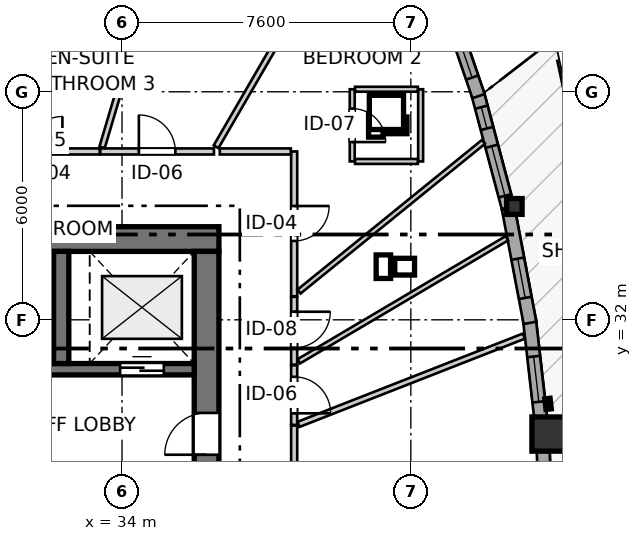
"""IFC4 building model, lengths in metres.
Left out: names, types, materials, properties, quantities, classifications, styles, units other than length and angle.
Written with IfcOpenShell. Run it as: python <this file> out.ifc"""

import sys

from ifc_helpers import new_model, si_unit, direction, frame, frame_2d, origin, origin_2d, place, context, subcontext, project, spatial, rectangle, i_section, extrude, source, transform, mapped, element, fill, save


model = new_model("IFC4")
c1 = context("Model", 3, precision=1e-05, world=origin(), true_north=direction((0.0, 1.0)))
c2 = subcontext(c1, "Body", "Model", "MODEL_VIEW")
j1 = project(units=[si_unit("LENGTHUNIT", "METRE"), si_unit("PLANEANGLEUNIT", "RADIAN")], contexts=[c1])
p1 = place(None, origin())
s1 = spatial("IfcSite", under=j1, at=p1, CompositionType="ELEMENT")
p2 = place(p1, origin())
s2 = spatial("IfcBuilding", under=s1, at=p2, CompositionType="ELEMENT")
p3 = place(p2, frame((0.0, 0.0, 89.6)))
s3 = spatial("IfcBuildingStorey", under=s2, at=p3, CompositionType="ELEMENT", Elevation=89.6)
p4 = place(p3, frame((36.55, 34.125, 0.0), z_axis=(0.0, 0.0, 1.0), x_axis=(-1.0, 0.0, 0.0)))
e1 = element("IfcWall", 1, at=p4, inside=s3, PredefinedType="SHEAR", context=c2, shape_type="SweptSolid", body=[
    extrude(rectangle(XDim=12.4, YDim=0.65, at=frame_2d((6.2, 0.0))), origin(), (0.0, 0.0, 1.0), 2.95),
])
p5 = place(p3, frame((36.225, 18.2, 0.0), z_axis=(0.0, 0.0, 1.0), x_axis=(0.0, 1.0, 0.0)))
e2 = element("IfcWall", 2, at=p5, inside=s3, PredefinedType="SHEAR", context=c2, shape_type="SweptSolid", body=[
    extrude(rectangle(XDim=15.6, YDim=0.65, at=frame_2d((7.8, 0.0))), origin(), (0.0, 0.0, 1.0), 2.95),
])
p6 = place(p5, frame((4.25, 0.0, 0.0)))
e3 = element("IfcOpeningElement", 3, at=p6, cuts=e2, PredefinedType="OPENING", context=c2, shape_type="SweptSolid", body=[
    extrude(rectangle(XDim=1.1, YDim=2.15, at=frame_2d((0.55, 1.075))), frame((0.0, 0.335, 0.0), z_axis=(0.0, -1.0, 0.0), x_axis=(1.0, 0.0, 0.0)), (0.0, 0.0, 1.0), 0.67),
])
p7 = place(p5, frame((10.25, 0.0, 0.0)))
e4 = element("IfcOpeningElement", 4, at=p7, cuts=e2, PredefinedType="OPENING", context=c2, shape_type="SweptSolid", body=[
    extrude(rectangle(XDim=1.1, YDim=2.15, at=frame_2d((0.55, 1.075))), frame((0.0, 0.335, 0.0), z_axis=(0.0, -1.0, 0.0), x_axis=(1.0, 0.0, 0.0)), (0.0, 0.0, 1.0), 0.67),
])
p8 = place(p3, frame((24.8, 30.7, 0.0), z_axis=(0.0, 0.0, 1.0), x_axis=(1.0, 0.0, 0.0)))
e5 = element("IfcWall", 5, at=p8, inside=s3, PredefinedType="SHEAR", context=c2, shape_type="SweptSolid", body=[
    extrude(rectangle(XDim=11.1, YDim=0.3, at=frame_2d((5.55, 0.0))), origin(), (0.0, 0.0, 1.0), 2.95),
])
p9 = place(p8, frame((6.22, 0.0, 0.0)))
e6 = element("IfcOpeningElement", 6, at=p9, cuts=e5, PredefinedType="OPENING", context=c2, shape_type="SweptSolid", body=[
    extrude(rectangle(XDim=0.98, YDim=2.15, at=frame_2d((0.49, 1.075))), frame((0.0, 0.16, 0.0), z_axis=(0.0, -1.0, 0.0), x_axis=(1.0, 0.0, 0.0)), (0.0, 0.0, 1.0), 0.32),
])
p10 = place(p8, frame((9.15, 0.0, 0.0)))
e7 = element("IfcOpeningElement", 7, at=p10, cuts=e5, PredefinedType="OPENING", context=c2, shape_type="SweptSolid", body=[
    extrude(rectangle(XDim=1.15, YDim=2.15, at=frame_2d((0.575, 1.075))), frame((0.0, 0.16, 0.0), z_axis=(0.0, -1.0, 0.0), x_axis=(1.0, 0.0, 0.0)), (0.0, 0.0, 1.0), 0.32),
])
p11 = place(p3, frame((32.4, 30.85, 0.0), z_axis=(0.0, 0.0, 1.0), x_axis=(0.0, 1.0, 0.0)))
e8 = element("IfcWall", 8, at=p11, inside=s3, PredefinedType="SHEAR", context=c2, shape_type="SweptSolid", body=[
    extrude(rectangle(XDim=2.95, YDim=0.4, at=frame_2d((1.475, 0.0))), origin(), (0.0, 0.0, 1.0), 2.95),
])
m1 = source(origin(), c2, "Body", "SweptSolid", [
    extrude(rectangle(XDim=0.9, YDim=0.9, at=origin_2d()), origin(), (0.0, 0.0, 1.0), 2.95),
])
p12 = place(p3, frame((45.236, 28.994, 0.0), z_axis=(0.0, 0.0, 1.0), x_axis=(1.0, 0.0, 0.0)))
e9 = element("IfcColumn", 9, at=p12, inside=s3, PredefinedType="COLUMN", context=c2, shape_type="MappedRepresentation", body=[
    mapped(m1, transform((0.0, 0.0, 0.0), x_axis=(1.0, 0.0, 0.0), y_axis=(0.0, 1.0, 0.0), z_axis=(0.0, 0.0, 1.0), scale=1.0)),
])
m2 = source(origin(), c2, "Body", "SweptSolid", [
    extrude(i_section(OverallWidth=0.406, OverallDepth=0.416, WebThickness=0.027, FlangeThickness=0.044, FilletRadius=0.015, at=origin_2d()), origin(), (0.0, 0.0, 1.0), 2.95),
])
p13 = place(p3, frame((44.325, 34.983, 0.0), z_axis=(0.0, 0.0, 1.0), x_axis=(1.0, 0.0, 0.0)))
e10 = element("IfcColumn", 10, at=p13, inside=s3, PredefinedType="PILASTER", context=c2, shape_type="MappedRepresentation", body=[
    mapped(m2, transform((0.0, 0.0, 0.0), x_axis=(1.0, 0.0, 0.0), y_axis=(0.0, 1.0, 0.0), z_axis=(0.0, 0.0, 1.0), scale=1.0)),
])
p14 = place(p3, frame((45.181, 25.956, 0.0), z_axis=(0.0, 0.0, 1.0), x_axis=(-0.037958336355, 0.999279322663, 0.0)))
e11 = element("IfcWall", 11, at=p14, inside=s3, PredefinedType="SOLIDWALL", context=c2, shape_type="SweptSolid", body=[
    extrude(rectangle(XDim=2.804, YDim=0.34, at=frame_2d((1.402, 0.0))), origin(), (0.0, 0.0, 1.0), 2.48),
])
p15 = place(p14, frame((0.732, 0.0, 0.82)))
e12 = element("IfcOpeningElement", 12, at=p15, cuts=e11, PredefinedType="OPENING", context=c2, shape_type="SweptSolid", body=[
    extrude(rectangle(XDim=1.35, YDim=1.45, at=frame_2d((0.675, 0.725))), frame((0.0, 0.18, 0.0), z_axis=(0.0, -1.0, 0.0), x_axis=(1.0, 0.0, 0.0)), (0.0, 0.0, 1.0), 0.36),
])
p16 = place(p3, frame((45.041, 29.204, 0.0), z_axis=(0.0, 0.0, 1.0), x_axis=(-0.113261075266, 0.993565261485, 0.0)))
e13 = element("IfcWall", 13, at=p16, inside=s3, PredefinedType="SOLIDWALL", context=c2, shape_type="SweptSolid", body=[
    extrude(rectangle(XDim=2.822, YDim=0.34, at=frame_2d((1.411, 0.0))), origin(), (0.0, 0.0, 1.0), 2.48),
])
p17 = place(p16, frame((0.642, 0.0, 0.82)))
e14 = element("IfcOpeningElement", 14, at=p17, cuts=e13, PredefinedType="OPENING", context=c2, shape_type="SweptSolid", body=[
    extrude(rectangle(XDim=1.2, YDim=1.45, at=frame_2d((0.6, 0.725))), frame((0.0, 0.18, 0.0), z_axis=(0.0, -1.0, 0.0), x_axis=(1.0, 0.0, 0.0)), (0.0, 0.0, 1.0), 0.36),
])
p18 = place(p3, frame((44.735, 31.919, 0.0), z_axis=(0.0, 0.0, 1.0), x_axis=(-0.186735196273, 0.982410284185, 0.0)))
e15 = element("IfcWall", 15, at=p18, inside=s3, PredefinedType="SOLIDWALL", context=c2, shape_type="SweptSolid", body=[
    extrude(rectangle(XDim=3.066, YDim=0.34, at=frame_2d((1.533, 0.0))), origin(), (0.0, 0.0, 1.0), 2.48),
])
p19 = place(p18, frame((0.669, 0.0, 0.82)))
e16 = element("IfcOpeningElement", 16, at=p19, cuts=e15, PredefinedType="OPENING", context=c2, shape_type="SweptSolid", body=[
    extrude(rectangle(XDim=1.05, YDim=1.45, at=frame_2d((0.525, 0.725))), frame((0.0, 0.18, 0.0), z_axis=(0.0, -1.0, 0.0), x_axis=(1.0, 0.0, 0.0)), (0.0, 0.0, 1.0), 0.36),
])
p20 = place(p3, frame((44.156, 34.958, 0.0), z_axis=(0.0, 0.0, 1.0), x_axis=(-0.257033600382, 0.966402467026, 0.0)))
e17 = element("IfcWall", 17, at=p20, inside=s3, PredefinedType="SOLIDWALL", context=c2, shape_type="SweptSolid", body=[
    extrude(rectangle(XDim=3.116, YDim=0.34, at=frame_2d((1.558, 0.0))), origin(), (0.0, 0.0, 1.0), 2.48),
])
p21 = place(p20, frame((0.315, 0.0, 0.82)))
e18 = element("IfcOpeningElement", 18, at=p21, cuts=e17, PredefinedType="OPENING", context=c2, shape_type="SweptSolid", body=[
    extrude(rectangle(XDim=1.35, YDim=1.45, at=frame_2d((0.675, 0.725))), frame((0.0, 0.18, 0.0), z_axis=(0.0, -1.0, 0.0), x_axis=(1.0, 0.0, 0.0)), (0.0, 0.0, 1.0), 0.36),
])
p22 = place(p20, frame((2.148, 0.0, 0.82)))
e19 = element("IfcOpeningElement", 19, at=p22, cuts=e17, PredefinedType="OPENING", context=c2, shape_type="SweptSolid", body=[
    extrude(rectangle(XDim=0.58, YDim=1.35, at=frame_2d((0.29, 0.675))), frame((0.0, 0.18, 0.0), z_axis=(0.0, -1.0, 0.0), x_axis=(1.0, 0.0, 0.0)), (0.0, 0.0, 1.0), 0.36),
])
p23 = place(p3, frame((43.38, 37.886, 0.0), z_axis=(0.0, 0.0, 1.0), x_axis=(-0.323536742898, 0.946215607562, 0.0)))
e20 = element("IfcWall", 20, at=p23, inside=s3, PredefinedType="SOLIDWALL", context=c2, shape_type="SweptSolid", body=[
    extrude(rectangle(XDim=2.972, YDim=0.34, at=frame_2d((1.486, 0.0))), origin(), (0.0, 0.0, 1.0), 2.48),
])
p24 = place(p23, frame((0.516, 0.0, 0.82)))
e21 = element("IfcOpeningElement", 21, at=p24, cuts=e20, PredefinedType="OPENING", context=c2, shape_type="SweptSolid", body=[
    extrude(rectangle(XDim=1.95, YDim=1.4, at=frame_2d((0.975, 0.7))), frame((0.0, 0.18, 0.0), z_axis=(0.0, -1.0, 0.0), x_axis=(1.0, 0.0, 0.0)), (0.0, 0.0, 1.0), 0.36),
])
p25 = place(p3, frame((38.53, 29.22, 0.0), z_axis=(0.0, 0.0, 1.0), x_axis=(0.0, -1.0, 0.0)))
e22 = element("IfcWall", 22, at=p25, inside=s3, PredefinedType="PARTITIONING", context=c2, shape_type="SweptSolid", body=[
    extrude(rectangle(XDim=4.467, YDim=0.16, at=frame_2d((2.233, 0.0))), origin(), (0.0, 0.0, 1.0), 2.95),
])
p26 = place(p25, frame((1.584, 0.0, 0.0)))
e23 = element("IfcOpeningElement", 23, at=p26, cuts=e22, PredefinedType="OPENING", context=c2, shape_type="SweptSolid", body=[
    extrude(rectangle(XDim=1.3, YDim=2.1, at=frame_2d((0.65, 1.05))), frame((0.0, 0.09, 0.0), z_axis=(0.0, -1.0, 0.0), x_axis=(1.0, 0.0, 0.0)), (0.0, 0.0, 1.0), 0.18),
])
p27 = place(p3, frame((38.53, 36.43, 0.0), z_axis=(0.0, 0.0, 1.0), x_axis=(0.0, -1.0, 0.0)))
e24 = element("IfcWall", 24, at=p27, inside=s3, PredefinedType="PARTITIONING", context=c2, shape_type="SweptSolid", body=[
    extrude(rectangle(XDim=3.81, YDim=0.16, at=frame_2d((1.905, 0.0))), origin(), (0.0, 0.0, 1.0), 2.588),
])
p28 = place(p27, frame((1.436, 0.0, 0.0)))
e25 = element("IfcOpeningElement", 25, at=p28, cuts=e24, PredefinedType="OPENING", context=c2, shape_type="SweptSolid", body=[
    extrude(rectangle(XDim=0.92, YDim=2.1, at=frame_2d((0.46, 1.05))), frame((0.0, 0.09, 0.0), z_axis=(0.0, -1.0, 0.0), x_axis=(1.0, 0.0, 0.0)), (0.0, 0.0, 1.0), 0.18),
])
p29 = place(p3, frame((33.428, 36.43, 0.0), z_axis=(0.0, 0.0, 1.0), x_axis=(1.0, 0.0, 0.0)))
e26 = element("IfcWall", 26, at=p29, inside=s3, PredefinedType="PARTITIONING", context=c2, shape_type="SweptSolid", body=[
    extrude(rectangle(XDim=2.992, YDim=0.16, at=frame_2d((1.496, 0.0))), origin(), (0.0, 0.0, 1.0), 2.95),
])
p30 = place(p29, frame((1.015, 0.0, 0.0)))
e27 = element("IfcOpeningElement", 27, at=p30, cuts=e26, PredefinedType="OPENING", context=c2, shape_type="SweptSolid", body=[
    extrude(rectangle(XDim=0.96, YDim=2.1, at=frame_2d((0.48, 1.05))), frame((0.0, 0.09, 0.0), z_axis=(0.0, -1.0, 0.0), x_axis=(1.0, 0.0, 0.0)), (0.0, 0.0, 1.0), 0.18),
])
p31 = place(p3, frame((30.529, 36.43, 0.0), z_axis=(0.0, 0.0, 1.0), x_axis=(1.0, 0.0, 0.0)))
e28 = element("IfcWall", 28, at=p31, inside=s3, PredefinedType="PARTITIONING", context=c2, shape_type="SweptSolid", body=[
    extrude(rectangle(XDim=2.884, YDim=0.16, at=frame_2d((1.442, 0.0))), origin(), (0.0, 0.0, 1.0), 2.95),
])
p32 = place(p31, frame((0.982, 0.0, 0.0)))
e29 = element("IfcOpeningElement", 29, at=p32, cuts=e28, PredefinedType="OPENING", context=c2, shape_type="SweptSolid", body=[
    extrude(rectangle(XDim=0.92, YDim=2.1, at=frame_2d((0.46, 1.05))), frame((0.0, 0.09, 0.0), z_axis=(0.0, -1.0, 0.0), x_axis=(1.0, 0.0, 0.0)), (0.0, 0.0, 1.0), 0.18),
])
p33 = place(p3, frame((40.058, 38.067, 0.0), z_axis=(0.0, 0.0, 1.0), x_axis=(0.0, -1.0, 0.0)))
e30 = element("IfcWall", 30, at=p33, inside=s3, PredefinedType="PARTITIONING", context=c2, shape_type="SweptSolid", body=[
    extrude(rectangle(XDim=1.9, YDim=0.13, at=frame_2d((0.95, 0.0))), origin(), (0.0, 0.0, 1.0), 2.95),
])
p34 = place(p33, frame((0.51, 0.0, 0.0)))
e31 = element("IfcOpeningElement", 31, at=p34, cuts=e30, PredefinedType="OPENING", context=c2, shape_type="SweptSolid", body=[
    extrude(rectangle(XDim=0.88, YDim=2.05, at=frame_2d((0.44, 1.025))), frame((0.0, 0.075, 0.0), z_axis=(0.0, -1.0, 0.0), x_axis=(1.0, 0.0, 0.0)), (0.0, 0.0, 1.0), 0.15),
])
p35 = place(p3, frame((38.53, 32.605, 0.0), z_axis=(0.0, 0.0, 1.0), x_axis=(0.0, -1.0, 0.0)))
e32 = element("IfcWall", 32, at=p35, inside=s3, PredefinedType="PARTITIONING", context=c2, shape_type="SweptSolid", body=[
    extrude(rectangle(XDim=1.786, YDim=0.16, at=frame_2d((0.893, 0.0))), origin(), (0.0, 0.0, 1.0), 2.95),
])
p36 = place(p35, frame((0.393, 0.0, 0.0)))
e33 = element("IfcOpeningElement", 33, at=p36, cuts=e32, PredefinedType="OPENING", context=c2, shape_type="SweptSolid", body=[
    extrude(rectangle(XDim=0.95, YDim=2.1, at=frame_2d((0.475, 1.05))), frame((0.0, 0.09, 0.0), z_axis=(0.0, -1.0, 0.0), x_axis=(1.0, 0.0, 0.0)), (0.0, 0.0, 1.0), 0.18),
])
p37 = place(p3, frame((38.53, 30.804, 0.0), z_axis=(0.0, 0.0, 1.0), x_axis=(0.0, -1.0, 0.0)))
e34 = element("IfcWall", 34, at=p37, inside=s3, PredefinedType="PARTITIONING", context=c2, shape_type="SweptSolid", body=[
    extrude(rectangle(XDim=1.569, YDim=0.16, at=frame_2d((0.784, 0.0))), origin(), (0.0, 0.0, 1.0), 2.95),
])
p38 = place(p37, frame((0.304, 0.0, 0.0)))
e35 = element("IfcOpeningElement", 35, at=p38, cuts=e34, PredefinedType="OPENING", context=c2, shape_type="SweptSolid", body=[
    extrude(rectangle(XDim=0.96, YDim=2.1, at=frame_2d((0.48, 1.05))), frame((0.0, 0.09, 0.0), z_axis=(0.0, -1.0, 0.0), x_axis=(1.0, 0.0, 0.0)), (0.0, 0.0, 1.0), 0.18),
])
p39 = place(p3, frame((36.475, 36.553, 0.0), z_axis=(0.0, 0.0, 1.0), x_axis=(0.501895508122, 0.864928262301, 0.0)))
e36 = element("IfcWall", 36, at=p39, inside=s3, PredefinedType="PARTITIONING", context=c2, shape_type="SweptSolid", body=[
    extrude(rectangle(XDim=8.958, YDim=0.145, at=frame_2d((4.479, 0.0))), origin(), (0.0, 0.0, 1.0), 2.95),
])
p40 = place(p3, frame((38.644, 29.249, 0.0), z_axis=(0.0, 0.0, 1.0), x_axis=(0.931159602012, 0.364611842349, 0.0)))
e37 = element("IfcWall", 37, at=p40, inside=s3, PredefinedType="PARTITIONING", context=c2, shape_type="SweptSolid", body=[
    extrude(rectangle(XDim=6.368, YDim=0.145, at=frame_2d((3.184, 0.0))), origin(), (0.0, 0.0, 1.0), 2.95),
])
p41 = place(p3, frame((38.65, 30.907, 0.0), z_axis=(0.0, 0.0, 1.0), x_axis=(0.860799697267, 0.508943888052, 0.0)))
e38 = element("IfcWall", 38, at=p41, inside=s3, PredefinedType="PARTITIONING", context=c2, shape_type="SweptSolid", body=[
    extrude(rectangle(XDim=6.363, YDim=0.13, at=frame_2d((3.181, 0.0))), origin(), (0.0, 0.0, 1.0), 2.95),
])
p42 = place(p3, frame((38.657, 32.742, 0.0), z_axis=(0.0, 0.0, 1.0), x_axis=(0.776413778101, 0.630223488276, 0.0)))
e39 = element("IfcWall", 39, at=p42, inside=s3, PredefinedType="PARTITIONING", context=c2, shape_type="SweptSolid", body=[
    extrude(rectangle(XDim=6.251, YDim=0.13, at=frame_2d((3.125, 0.0))), origin(), (0.0, 0.0, 1.0), 2.95),
])
p43 = place(p3, frame((33.476, 36.538, 0.0), z_axis=(0.0, 0.0, 1.0), x_axis=(0.284300835747, 0.958735122332, 0.0)))
e40 = element("IfcWall", 40, at=p43, inside=s3, PredefinedType="PARTITIONING", context=c2, shape_type="SweptSolid", body=[
    extrude(rectangle(XDim=3.56, YDim=0.145, at=frame_2d((1.78, 0.0))), origin(), (0.0, 0.0, 1.0), 2.95),
])
p44 = place(p3, frame((36.573, 36.43, 0.0), z_axis=(0.0, 0.0, 1.0), x_axis=(1.0, 0.0, 0.0)))
e41 = element("IfcWall", 41, at=p44, inside=s3, PredefinedType="PARTITIONING", context=c2, shape_type="SweptSolid", body=[
    extrude(rectangle(XDim=1.869, YDim=0.16, at=frame_2d((0.934, 0.0))), origin(), (0.0, 0.0, 1.0), 2.588),
])
p45 = place(p3, frame((41.858, 36.167, 0.0), z_axis=(0.0, 0.0, 1.0), x_axis=(0.0, 1.0, 0.0)))
e42 = element("IfcWall", 42, at=p45, inside=s3, PredefinedType="PARTITIONING", context=c2, shape_type="SweptSolid", body=[
    extrude(rectangle(XDim=1.9, YDim=0.13, at=frame_2d((0.95, 0.0))), origin(), (0.0, 0.0, 1.0), 2.95),
])
for number, where, z_axis, x_axis in (
    (43, (40.131, 38.067, 0.0), (0.0, 0.0, 1.0), (1.0, 0.0, 0.0)),
    (44, (40.131, 36.167, 0.0), (0.0, 0.0, 1.0), (1.0, 0.0, 0.0)),
):
    element("IfcWall", number, at=place(p3, frame(where, z_axis=z_axis, x_axis=x_axis)), inside=s3, PredefinedType="PARTITIONING", context=c2, shape_type="SweptSolid", body=[
        extrude(rectangle(XDim=1.654, YDim=0.13, at=frame_2d((0.827, 0.0))), origin(), (0.0, 0.0, 1.0), 2.95),
    ])
m3 = source(origin(), c2, "Body", "SweptSolid", [
    extrude(rectangle(XDim=1.2, YDim=1.45, at=frame_2d((0.6, 0.725))), frame((0.0, 0.03, 0.0), z_axis=(0.0, -1.0, 0.0), x_axis=(1.0, 0.0, 0.0)), (0.0, 0.0, 1.0), 0.06),
])
p46 = place(p17, origin())
e45 = element("IfcWindow", 45, at=p46, inside=s3, PartitioningType="SINGLE_PANEL", PredefinedType="WINDOW", context=c2, shape_type="MappedRepresentation", body=[
    mapped(m3, transform((0.0, 0.0, 0.0), x_axis=(1.0, 0.0, 0.0), y_axis=(0.0, 1.0, 0.0), z_axis=(0.0, 0.0, 1.0), scale=1.0)),
])
fill(e14, e45)
m4 = source(origin(), c2, "Body", "SweptSolid", [
    extrude(rectangle(XDim=1.05, YDim=1.45, at=frame_2d((0.525, 0.725))), frame((0.0, 0.03, 0.0), z_axis=(0.0, -1.0, 0.0), x_axis=(1.0, 0.0, 0.0)), (0.0, 0.0, 1.0), 0.06),
])
p47 = place(p19, origin())
e46 = element("IfcWindow", 46, at=p47, inside=s3, PartitioningType="SINGLE_PANEL", PredefinedType="WINDOW", context=c2, shape_type="MappedRepresentation", body=[
    mapped(m4, transform((0.0, 0.0, 0.0), x_axis=(1.0, 0.0, 0.0), y_axis=(0.0, 1.0, 0.0), z_axis=(0.0, 0.0, 1.0), scale=1.0)),
])
fill(e16, e46)
m5 = source(origin(), c2, "Body", "SweptSolid", [
    extrude(rectangle(XDim=1.35, YDim=1.45, at=frame_2d((0.675, 0.725))), frame((0.0, 0.03, 0.0), z_axis=(0.0, -1.0, 0.0), x_axis=(1.0, 0.0, 0.0)), (0.0, 0.0, 1.0), 0.06),
])
p48 = place(p21, origin())
e47 = element("IfcWindow", 47, at=p48, inside=s3, PartitioningType="SINGLE_PANEL", PredefinedType="WINDOW", context=c2, shape_type="MappedRepresentation", body=[
    mapped(m5, transform((0.0, 0.0, 0.0), x_axis=(1.0, 0.0, 0.0), y_axis=(0.0, 1.0, 0.0), z_axis=(0.0, 0.0, 1.0), scale=1.0)),
])
fill(e18, e47)
m6 = source(origin(), c2, "Body", "SweptSolid", [
    extrude(rectangle(XDim=0.58, YDim=1.35, at=frame_2d((0.29, 0.675))), frame((0.0, 0.03, 0.0), z_axis=(0.0, -1.0, 0.0), x_axis=(1.0, 0.0, 0.0)), (0.0, 0.0, 1.0), 0.06),
])
p49 = place(p22, origin())
e48 = element("IfcWindow", 48, at=p49, inside=s3, PartitioningType="SINGLE_PANEL", PredefinedType="WINDOW", context=c2, shape_type="MappedRepresentation", body=[
    mapped(m6, transform((0.0, 0.0, 0.0), x_axis=(1.0, 0.0, 0.0), y_axis=(0.0, 1.0, 0.0), z_axis=(0.0, 0.0, 1.0), scale=1.0)),
])
fill(e19, e48)
m7 = source(origin(), c2, "Body", "SweptSolid", [
    extrude(rectangle(XDim=1.95, YDim=1.4, at=frame_2d((0.975, 0.7))), frame((0.0, 0.03, 0.0), z_axis=(0.0, -1.0, 0.0), x_axis=(1.0, 0.0, 0.0)), (0.0, 0.0, 1.0), 0.06),
])
p50 = place(p24, origin())
e49 = element("IfcWindow", 49, at=p50, inside=s3, PartitioningType="SINGLE_PANEL", PredefinedType="WINDOW", context=c2, shape_type="MappedRepresentation", body=[
    mapped(m7, transform((0.0, 0.0, 0.0), x_axis=(1.0, 0.0, 0.0), y_axis=(0.0, 1.0, 0.0), z_axis=(0.0, 0.0, 1.0), scale=1.0)),
])
fill(e21, e49)
m8 = source(origin(), c2, "Body", "SweptSolid", [
    extrude(rectangle(XDim=1.15, YDim=2.15, at=frame_2d((0.575, 1.075))), frame((0.0, 0.025, 0.0), z_axis=(0.0, -1.0, 0.0), x_axis=(1.0, 0.0, 0.0)), (0.0, 0.0, 1.0), 0.05),
])
p51 = place(p10, origin())
e50 = element("IfcDoor", 50, at=p51, inside=s3, OperationType="DOUBLE_DOOR_SLIDING", PredefinedType="DOOR", context=c2, shape_type="MappedRepresentation", body=[
    mapped(m8, transform((0.0, 0.0, 0.0), x_axis=(1.0, 0.0, 0.0), y_axis=(0.0, 1.0, 0.0), z_axis=(0.0, 0.0, 1.0), scale=1.0)),
])
fill(e7, e50)
m9 = source(origin(), c2, "Body", "SweptSolid", [
    extrude(rectangle(XDim=1.1, YDim=2.15, at=frame_2d((0.55, 1.075))), frame((0.0, 0.025, 0.0), z_axis=(0.0, -1.0, 0.0), x_axis=(1.0, 0.0, 0.0)), (0.0, 0.0, 1.0), 0.05),
])
p52 = place(p7, origin())
e51 = element("IfcDoor", 51, at=p52, inside=s3, OperationType="SINGLE_SWING_LEFT", PredefinedType="DOOR", context=c2, shape_type="MappedRepresentation", body=[
    mapped(m9, transform((0.0, 0.0, 0.0), x_axis=(1.0, 0.0, 0.0), y_axis=(0.0, 1.0, 0.0), z_axis=(0.0, 0.0, 1.0), scale=1.0)),
])
fill(e4, e51)
m10 = source(origin(), c2, "Body", "SweptSolid", [
    extrude(rectangle(XDim=0.92, YDim=2.1, at=frame_2d((0.46, 1.05))), frame((0.0, 0.025, 0.0), z_axis=(0.0, -1.0, 0.0), x_axis=(1.0, 0.0, 0.0)), (0.0, 0.0, 1.0), 0.05),
])
p53 = place(p28, origin())
e52 = element("IfcDoor", 52, at=p53, inside=s3, OperationType="SINGLE_SWING_LEFT", PredefinedType="DOOR", context=c2, shape_type="MappedRepresentation", body=[
    mapped(m10, transform((0.0, 0.0, 0.0), x_axis=(1.0, 0.0, 0.0), y_axis=(0.0, 1.0, 0.0), z_axis=(0.0, 0.0, 1.0), scale=1.0)),
])
fill(e25, e52)
m11 = source(origin(), c2, "Body", "SweptSolid", [
    extrude(rectangle(XDim=0.96, YDim=2.1, at=frame_2d((0.48, 1.05))), frame((0.0, 0.025, 0.0), z_axis=(0.0, -1.0, 0.0), x_axis=(1.0, 0.0, 0.0)), (0.0, 0.0, 1.0), 0.05),
])
p54 = place(p30, origin())
e53 = element("IfcDoor", 53, at=p54, inside=s3, OperationType="SINGLE_SWING_LEFT", PredefinedType="DOOR", context=c2, shape_type="MappedRepresentation", body=[
    mapped(m11, transform((0.0, 0.0, 0.0), x_axis=(1.0, 0.0, 0.0), y_axis=(0.0, 1.0, 0.0), z_axis=(0.0, 0.0, 1.0), scale=1.0)),
])
fill(e27, e53)
p55 = place(p32, origin())
e54 = element("IfcDoor", 54, at=p55, inside=s3, OperationType="SINGLE_SWING_RIGHT", PredefinedType="DOOR", context=c2, shape_type="MappedRepresentation", body=[
    mapped(m10, transform((0.0, 0.0, 0.0), x_axis=(1.0, 0.0, 0.0), y_axis=(0.0, 1.0, 0.0), z_axis=(0.0, 0.0, 1.0), scale=1.0)),
])
fill(e29, e54)
m12 = source(origin(), c2, "Body", "SweptSolid", [
    extrude(rectangle(XDim=0.88, YDim=2.05, at=frame_2d((0.44, 1.025))), frame((0.0, 0.025, 0.0), z_axis=(0.0, -1.0, 0.0), x_axis=(1.0, 0.0, 0.0)), (0.0, 0.0, 1.0), 0.05),
])
p56 = place(p34, origin())
e55 = element("IfcDoor", 55, at=p56, inside=s3, OperationType="SINGLE_SWING_RIGHT", PredefinedType="DOOR", context=c2, shape_type="MappedRepresentation", body=[
    mapped(m12, transform((0.0, 0.0, 0.0), x_axis=(1.0, 0.0, 0.0), y_axis=(0.0, 1.0, 0.0), z_axis=(0.0, 0.0, 1.0), scale=1.0)),
])
fill(e31, e55)
m13 = source(origin(), c2, "Body", "SweptSolid", [
    extrude(rectangle(XDim=0.95, YDim=2.1, at=frame_2d((0.475, 1.05))), frame((0.0, 0.025, 0.0), z_axis=(0.0, -1.0, 0.0), x_axis=(1.0, 0.0, 0.0)), (0.0, 0.0, 1.0), 0.05),
])
p57 = place(p36, origin())
e56 = element("IfcDoor", 56, at=p57, inside=s3, OperationType="SINGLE_SWING_LEFT", PredefinedType="DOOR", context=c2, shape_type="MappedRepresentation", body=[
    mapped(m13, transform((0.0, 0.0, 0.0), x_axis=(1.0, 0.0, 0.0), y_axis=(0.0, 1.0, 0.0), z_axis=(0.0, 0.0, 1.0), scale=1.0)),
])
fill(e33, e56)
p58 = place(p38, origin())
e57 = element("IfcDoor", 57, at=p58, inside=s3, OperationType="SINGLE_SWING_RIGHT", PredefinedType="DOOR", context=c2, shape_type="MappedRepresentation", body=[
    mapped(m11, transform((0.0, 0.0, 0.0), x_axis=(1.0, 0.0, 0.0), y_axis=(0.0, 1.0, 0.0), z_axis=(0.0, 0.0, 1.0), scale=1.0)),
])
fill(e35, e57)
save(model, sys.argv[1])
